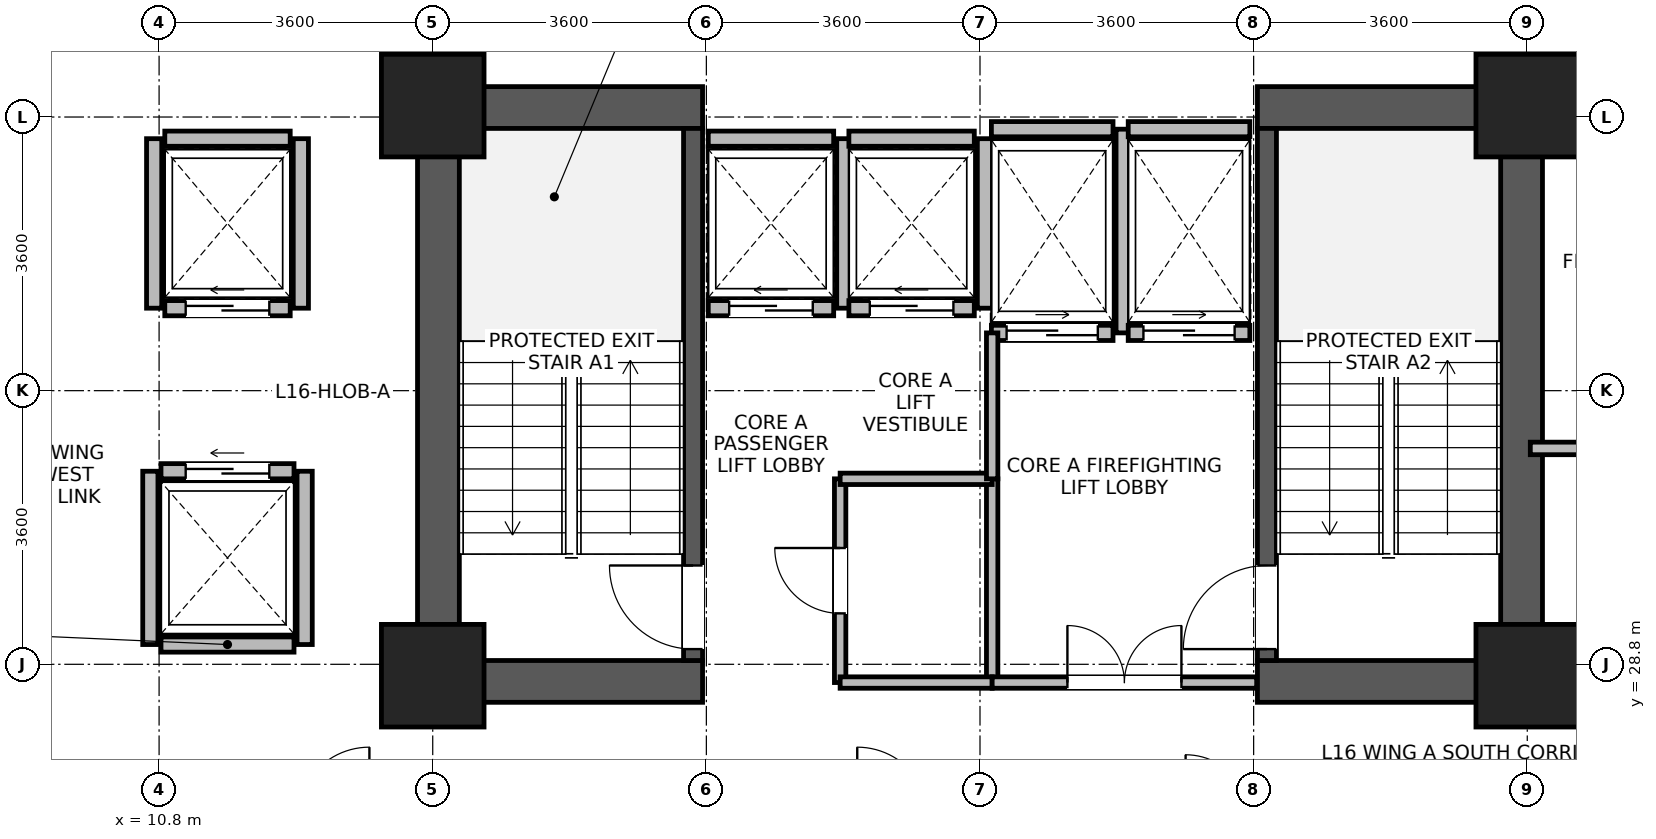
"""IFC4 building model, lengths in metres.
Left out: names, types, materials, properties, quantities, classifications, styles, units other than length and angle.
Written with IfcOpenShell. Run it as: python <this file> out.ifc"""

import sys

from ifc_helpers import new_model, si_unit, direction, frame, frame_2d, origin, origin_2d, place, context, subcontext, project, spatial, rectangle, extrude, source, transform, mapped, element, fill, save


model = new_model("IFC4")
c1 = context("Model", 3, precision=1e-05, world=origin(), true_north=direction((0.0, 1.0)))
c2 = subcontext(c1, "Body", "Model", "MODEL_VIEW")
j1 = project(units=[si_unit("LENGTHUNIT", "METRE"), si_unit("PLANEANGLEUNIT", "RADIAN")], contexts=[c1])
p1 = place(None, origin())
s1 = spatial("IfcSite", under=j1, at=p1, CompositionType="ELEMENT")
p2 = place(p1, origin())
s2 = spatial("IfcBuilding", under=s1, at=p2, CompositionType="ELEMENT")
p3 = place(p2, frame((0.0, 0.0, 66.0)))
s3 = spatial("IfcBuildingStorey", under=s2, at=p3, CompositionType="ELEMENT", Elevation=66.0)
for number, where, z_axis, x_axis in (
    (1, (14.475, 28.3, 0.0), (0.0, 0.0, 1.0), (0.0, 1.0, 0.0)),
    (2, (28.725, 28.3, 0.0), (0.0, 0.0, 1.0), (0.0, 1.0, 0.0)),
):
    element("IfcWall", number, at=place(p3, frame(where, z_axis=z_axis, x_axis=x_axis)), inside=s3, PredefinedType="SHEAR", context=c2, shape_type="SweptSolid", body=[
        extrude(rectangle(XDim=8.1, YDim=0.55, at=frame_2d((4.05, 0.0))), origin(), (0.0, 0.0, 1.0), 3.45),
    ])
for number, where, z_axis, x_axis in (
    (3, (14.75, 28.575, 0.0), (0.0, 0.0, 1.0), (1.0, 0.0, 0.0)),
    (4, (25.25, 28.575, 0.0), (0.0, 0.0, 1.0), (1.0, 0.0, 0.0)),
    (5, (14.75, 36.125, 0.0), (0.0, 0.0, 1.0), (1.0, 0.0, 0.0)),
    (6, (25.25, 36.125, 0.0), (0.0, 0.0, 1.0), (1.0, 0.0, 0.0)),
):
    element("IfcWall", number, at=place(p3, frame(where, z_axis=z_axis, x_axis=x_axis)), inside=s3, PredefinedType="SHEAR", context=c2, shape_type="SweptSolid", body=[
        extrude(rectangle(XDim=3.2, YDim=0.55, at=frame_2d((1.6, 0.0))), origin(), (0.0, 0.0, 1.0), 3.45),
    ])
p4 = place(p3, frame((17.825, 28.85, 0.0), z_axis=(0.0, 0.0, 1.0), x_axis=(0.0, 1.0, 0.0)))
e7 = element("IfcWall", 7, at=p4, inside=s3, PredefinedType="SHEAR", context=c2, shape_type="SweptSolid", body=[
    extrude(rectangle(XDim=7.0, YDim=0.25, at=frame_2d((3.5, 0.0))), origin(), (0.0, 0.0, 1.0), 3.45),
])
p5 = place(p4, frame((0.15, 0.0, 0.0)))
e8 = element("IfcOpeningElement", 8, at=p5, cuts=e7, PredefinedType="OPENING", context=c2, shape_type="SweptSolid", body=[
    extrude(rectangle(XDim=1.1, YDim=2.08, at=frame_2d((0.55, 1.04))), frame((0.0, 0.135, 0.0), z_axis=(0.0, -1.0, 0.0), x_axis=(1.0, 0.0, 0.0)), (0.0, 0.0, 1.0), 0.27),
])
p6 = place(p3, frame((25.375, 28.85, 0.0), z_axis=(0.0, 0.0, 1.0), x_axis=(0.0, 1.0, 0.0)))
e9 = element("IfcWall", 9, at=p6, inside=s3, PredefinedType="SHEAR", context=c2, shape_type="SweptSolid", body=[
    extrude(rectangle(XDim=7.0, YDim=0.25, at=frame_2d((3.5, 0.0))), origin(), (0.0, 0.0, 1.0), 3.45),
])
p7 = place(p6, frame((0.15, 0.0, 0.0)))
e10 = element("IfcOpeningElement", 10, at=p7, cuts=e9, PredefinedType="OPENING", context=c2, shape_type="SweptSolid", body=[
    extrude(rectangle(XDim=1.1, YDim=2.08, at=frame_2d((0.55, 1.04))), frame((0.0, 0.135, 0.0), z_axis=(0.0, -1.0, 0.0), x_axis=(1.0, 0.0, 0.0)), (0.0, 0.0, 1.0), 0.27),
])
m1 = source(origin(), c2, "Body", "SweptSolid", [
    extrude(rectangle(XDim=1.35, YDim=1.35, at=origin_2d()), origin(), (0.0, 0.0, 1.0), 3.7),
])
for number, where, z_axis, x_axis in (
    (11, (14.4, 28.65, 0.0), (0.0, 0.0, 1.0), (1.0, 0.0, 0.0)),
    (12, (14.4, 36.15, 0.0), (0.0, 0.0, 1.0), (1.0, 0.0, 0.0)),
    (13, (28.8, 28.65, 0.0), (0.0, 0.0, 1.0), (1.0, 0.0, 0.0)),
    (14, (28.8, 36.15, 0.0), (0.0, 0.0, 1.0), (1.0, 0.0, 0.0)),
):
    element("IfcColumn", number, at=place(p3, frame(where, z_axis=z_axis, x_axis=x_axis)), inside=s3, PredefinedType="COLUMN", context=c2, shape_type="MappedRepresentation", body=[
        mapped(m1, transform((0.0, 0.0, 0.0), x_axis=(1.0, 0.0, 0.0), y_axis=(0.0, 1.0, 0.0), z_axis=(0.0, 0.0, 1.0), scale=1.0)),
    ])
p8 = place(p3, frame((18.025, 33.485, 0.0), z_axis=(0.0, 0.0, 1.0), x_axis=(1.0, 0.0, 0.0)))
e15 = element("IfcWall", 15, at=p8, inside=s3, PredefinedType="PARTITIONING", context=c2, shape_type="SweptSolid", body=[
    extrude(rectangle(XDim=1.65, YDim=0.2, at=frame_2d((0.825, 0.0))), origin(), (0.0, 0.0, 1.0), 3.43),
])
p9 = place(p8, frame((0.275, 0.0, 0.0)))
e16 = element("IfcOpeningElement", 16, at=p9, cuts=e15, PredefinedType="OPENING", context=c2, shape_type="SweptSolid", body=[
    extrude(rectangle(XDim=1.1, YDim=2.12, at=frame_2d((0.55, 1.06))), frame((0.0, 0.11, 0.0), z_axis=(0.0, -1.0, 0.0), x_axis=(1.0, 0.0, 0.0)), (0.0, 0.0, 1.0), 0.22),
])
p10 = place(p3, frame((18.025, 35.715, 0.0), z_axis=(0.0, 0.0, 1.0), x_axis=(1.0, 0.0, 0.0)))
e17 = element("IfcWall", 17, at=p10, inside=s3, PredefinedType="PARTITIONING", context=c2, shape_type="SweptSolid", body=[
    extrude(rectangle(XDim=1.65, YDim=0.2, at=frame_2d((0.825, 0.0))), origin(), (0.0, 0.0, 1.0), 2.23),
])
p11 = place(p3, frame((19.815, 33.485, 0.0), z_axis=(0.0, 0.0, 1.0), x_axis=(0.0, 1.0, 0.0)))
e18 = element("IfcWall", 18, at=p11, inside=s3, PredefinedType="PARTITIONING", context=c2, shape_type="SweptSolid", body=[
    extrude(rectangle(XDim=2.23, YDim=0.2, at=frame_2d((1.115, 0.0))), origin(), (0.0, 0.0, 1.0), 3.43),
])
p12 = place(p3, frame((19.875, 33.485, 0.0), z_axis=(0.0, 0.0, 1.0), x_axis=(1.0, 0.0, 0.0)))
e19 = element("IfcWall", 19, at=p12, inside=s3, PredefinedType="PARTITIONING", context=c2, shape_type="SweptSolid", body=[
    extrude(rectangle(XDim=1.65, YDim=0.2, at=frame_2d((0.825, 0.0))), origin(), (0.0, 0.0, 1.0), 3.43),
])
p13 = place(p12, frame((0.275, 0.0, 0.0)))
e20 = element("IfcOpeningElement", 20, at=p13, cuts=e19, PredefinedType="OPENING", context=c2, shape_type="SweptSolid", body=[
    extrude(rectangle(XDim=1.1, YDim=2.12, at=frame_2d((0.55, 1.06))), frame((0.0, 0.11, 0.0), z_axis=(0.0, -1.0, 0.0), x_axis=(1.0, 0.0, 0.0)), (0.0, 0.0, 1.0), 0.22),
])
p14 = place(p3, frame((19.875, 35.715, 0.0), z_axis=(0.0, 0.0, 1.0), x_axis=(1.0, 0.0, 0.0)))
e21 = element("IfcWall", 21, at=p14, inside=s3, PredefinedType="PARTITIONING", context=c2, shape_type="SweptSolid", body=[
    extrude(rectangle(XDim=1.65, YDim=0.2, at=frame_2d((0.825, 0.0))), origin(), (0.0, 0.0, 1.0), 2.23),
])
p15 = place(p3, frame((21.665, 33.485, 0.0), z_axis=(0.0, 0.0, 1.0), x_axis=(0.0, 1.0, 0.0)))
e22 = element("IfcWall", 22, at=p15, inside=s3, PredefinedType="PARTITIONING", context=c2, shape_type="SweptSolid", body=[
    extrude(rectangle(XDim=2.23, YDim=0.2, at=frame_2d((1.115, 0.0))), origin(), (0.0, 0.0, 1.0), 3.43),
])
p16 = place(p3, frame((10.825, 29.06, 0.0), z_axis=(0.0, 0.0, 1.0), x_axis=(1.0, 0.0, 0.0)))
e23 = element("IfcWall", 23, at=p16, inside=s3, PredefinedType="PARTITIONING", context=c2, shape_type="SweptSolid", body=[
    extrude(rectangle(XDim=1.75, YDim=0.2, at=frame_2d((0.875, 0.0))), origin(), (0.0, 0.0, 1.0), 3.43),
])
p17 = place(p3, frame((10.825, 31.34, 0.0), z_axis=(0.0, 0.0, 1.0), x_axis=(1.0, 0.0, 0.0)))
e24 = element("IfcWall", 24, at=p17, inside=s3, PredefinedType="PARTITIONING", context=c2, shape_type="SweptSolid", body=[
    extrude(rectangle(XDim=1.75, YDim=0.2, at=frame_2d((0.875, 0.0))), origin(), (0.0, 0.0, 1.0), 3.43),
])
p18 = place(p17, frame((0.325, 0.0, 0.0)))
e25 = element("IfcOpeningElement", 25, at=p18, cuts=e24, PredefinedType="OPENING", context=c2, shape_type="SweptSolid", body=[
    extrude(rectangle(XDim=1.1, YDim=2.12, at=frame_2d((0.55, 1.06))), frame((0.0, 0.11, 0.0), z_axis=(0.0, -1.0, 0.0), x_axis=(1.0, 0.0, 0.0)), (0.0, 0.0, 1.0), 0.22),
])
for number, where, z_axis, x_axis in (
    (26, (10.685, 29.06, 0.0), (0.0, 0.0, 1.0), (0.0, 1.0, 0.0)),
    (27, (12.715, 29.06, 0.0), (0.0, 0.0, 1.0), (0.0, 1.0, 0.0)),
):
    element("IfcWall", number, at=place(p3, frame(where, z_axis=z_axis, x_axis=x_axis)), inside=s3, PredefinedType="PARTITIONING", context=c2, shape_type="SweptSolid", body=[
        extrude(rectangle(XDim=2.28, YDim=0.2, at=frame_2d((1.14, 0.0))), origin(), (0.0, 0.0, 1.0), 3.43),
    ])
p19 = place(p3, frame((10.875, 33.485, 0.0), z_axis=(0.0, 0.0, 1.0), x_axis=(1.0, 0.0, 0.0)))
e28 = element("IfcWall", 28, at=p19, inside=s3, PredefinedType="PARTITIONING", context=c2, shape_type="SweptSolid", body=[
    extrude(rectangle(XDim=1.65, YDim=0.2, at=frame_2d((0.825, 0.0))), origin(), (0.0, 0.0, 1.0), 3.43),
])
p20 = place(p19, frame((0.275, 0.0, 0.0)))
e29 = element("IfcOpeningElement", 29, at=p20, cuts=e28, PredefinedType="OPENING", context=c2, shape_type="SweptSolid", body=[
    extrude(rectangle(XDim=1.1, YDim=2.12, at=frame_2d((0.55, 1.06))), frame((0.0, 0.11, 0.0), z_axis=(0.0, -1.0, 0.0), x_axis=(1.0, 0.0, 0.0)), (0.0, 0.0, 1.0), 0.22),
])
p21 = place(p3, frame((10.875, 35.715, 0.0), z_axis=(0.0, 0.0, 1.0), x_axis=(1.0, 0.0, 0.0)))
e30 = element("IfcWall", 30, at=p21, inside=s3, PredefinedType="PARTITIONING", context=c2, shape_type="SweptSolid", body=[
    extrude(rectangle(XDim=1.65, YDim=0.2, at=frame_2d((0.825, 0.0))), origin(), (0.0, 0.0, 1.0), 3.43),
])
for number, where, z_axis, x_axis in (
    (31, (10.735, 33.485, 0.0), (0.0, 0.0, 1.0), (0.0, 1.0, 0.0)),
    (32, (12.665, 33.485, 0.0), (0.0, 0.0, 1.0), (0.0, 1.0, 0.0)),
):
    element("IfcWall", number, at=place(p3, frame(where, z_axis=z_axis, x_axis=x_axis)), inside=s3, PredefinedType="PARTITIONING", context=c2, shape_type="SweptSolid", body=[
        extrude(rectangle(XDim=2.23, YDim=0.2, at=frame_2d((1.115, 0.0))), origin(), (0.0, 0.0, 1.0), 3.43),
    ])
p22 = place(p3, frame((21.75, 33.16, 0.0), z_axis=(0.0, 0.0, 1.0), x_axis=(1.0, 0.0, 0.0)))
e33 = element("IfcWall", 33, at=p22, inside=s3, PredefinedType="PARTITIONING", context=c2, shape_type="SweptSolid", body=[
    extrude(rectangle(XDim=1.6, YDim=0.2, at=frame_2d((0.8, 0.0))), origin(), (0.0, 0.0, 1.0), 3.43),
])
p23 = place(p22, frame((0.2, 0.0, 0.0)))
e34 = element("IfcOpeningElement", 34, at=p23, cuts=e33, PredefinedType="OPENING", context=c2, shape_type="SweptSolid", body=[
    extrude(rectangle(XDim=1.2, YDim=2.12, at=frame_2d((0.6, 1.06))), frame((0.0, 0.11, 0.0), z_axis=(0.0, -1.0, 0.0), x_axis=(1.0, 0.0, 0.0)), (0.0, 0.0, 1.0), 0.22),
])
p24 = place(p3, frame((21.75, 35.84, 0.0), z_axis=(0.0, 0.0, 1.0), x_axis=(1.0, 0.0, 0.0)))
e35 = element("IfcWall", 35, at=p24, inside=s3, PredefinedType="PARTITIONING", context=c2, shape_type="SweptSolid", body=[
    extrude(rectangle(XDim=1.6, YDim=0.2, at=frame_2d((0.8, 0.0))), origin(), (0.0, 0.0, 1.0), 2.23),
])
p25 = place(p3, frame((23.49, 33.16, 0.0), z_axis=(0.0, 0.0, 1.0), x_axis=(0.0, 1.0, 0.0)))
e36 = element("IfcWall", 36, at=p25, inside=s3, PredefinedType="PARTITIONING", context=c2, shape_type="SweptSolid", body=[
    extrude(rectangle(XDim=2.68, YDim=0.2, at=frame_2d((1.34, 0.0))), origin(), (0.0, 0.0, 1.0), 3.43),
])
p26 = place(p3, frame((23.55, 33.16, 0.0), z_axis=(0.0, 0.0, 1.0), x_axis=(1.0, 0.0, 0.0)))
e37 = element("IfcWall", 37, at=p26, inside=s3, PredefinedType="PARTITIONING", context=c2, shape_type="SweptSolid", body=[
    extrude(rectangle(XDim=1.6, YDim=0.2, at=frame_2d((0.8, 0.0))), origin(), (0.0, 0.0, 1.0), 3.43),
])
p27 = place(p26, frame((0.2, 0.0, 0.0)))
e38 = element("IfcOpeningElement", 38, at=p27, cuts=e37, PredefinedType="OPENING", context=c2, shape_type="SweptSolid", body=[
    extrude(rectangle(XDim=1.2, YDim=2.12, at=frame_2d((0.6, 1.06))), frame((0.0, 0.11, 0.0), z_axis=(0.0, -1.0, 0.0), x_axis=(1.0, 0.0, 0.0)), (0.0, 0.0, 1.0), 0.22),
])
p28 = place(p3, frame((23.55, 35.84, 0.0), z_axis=(0.0, 0.0, 1.0), x_axis=(1.0, 0.0, 0.0)))
e39 = element("IfcWall", 39, at=p28, inside=s3, PredefinedType="PARTITIONING", context=c2, shape_type="SweptSolid", body=[
    extrude(rectangle(XDim=1.6, YDim=0.2, at=frame_2d((0.8, 0.0))), origin(), (0.0, 0.0, 1.0), 2.23),
])
p29 = place(p3, frame((19.76, 28.56, 0.0), z_axis=(0.0, 0.0, 1.0), x_axis=(0.0, 1.0, 0.0)))
e40 = element("IfcWall", 40, at=p29, inside=s3, PredefinedType="PARTITIONING", context=c2, shape_type="SweptSolid", body=[
    extrude(rectangle(XDim=2.68, YDim=0.15, at=frame_2d((1.34, 0.0))), origin(), (0.0, 0.0, 1.0), 3.43),
])
p30 = place(p29, frame((0.91, 0.0, 0.0)))
e41 = element("IfcOpeningElement", 41, at=p30, cuts=e40, PredefinedType="OPENING", context=c2, shape_type="SweptSolid", body=[
    extrude(rectangle(XDim=0.86, YDim=2.02, at=frame_2d((0.43, 1.01))), frame((0.0, 0.085, 0.0), z_axis=(0.0, -1.0, 0.0), x_axis=(1.0, 0.0, 0.0)), (0.0, 0.0, 1.0), 0.17),
])
p31 = place(p3, frame((21.76, 28.56, 0.0), z_axis=(0.0, 0.0, 1.0), x_axis=(0.0, 1.0, 0.0)))
e42 = element("IfcWall", 42, at=p31, inside=s3, PredefinedType="PARTITIONING", context=c2, shape_type="SweptSolid", body=[
    extrude(rectangle(XDim=2.68, YDim=0.15, at=frame_2d((1.34, 0.0))), origin(), (0.0, 0.0, 1.0), 3.43),
])
p32 = place(p3, frame((19.76, 28.56, 0.0), z_axis=(0.0, 0.0, 1.0), x_axis=(1.0, 0.0, 0.0)))
e43 = element("IfcWall", 43, at=p32, inside=s3, PredefinedType="PARTITIONING", context=c2, shape_type="SweptSolid", body=[
    extrude(rectangle(XDim=2.0, YDim=0.15, at=frame_2d((1.0, 0.0))), origin(), (0.0, 0.0, 1.0), 2.23),
])
p33 = place(p3, frame((19.76, 31.24, 0.0), z_axis=(0.0, 0.0, 1.0), x_axis=(1.0, 0.0, 0.0)))
e44 = element("IfcWall", 44, at=p33, inside=s3, PredefinedType="PARTITIONING", context=c2, shape_type="SweptSolid", body=[
    extrude(rectangle(XDim=2.0, YDim=0.15, at=frame_2d((1.0, 0.0))), origin(), (0.0, 0.0, 1.0), 3.43),
])
p34 = place(p3, frame((28.84, 31.64, 0.0), z_axis=(0.0, 0.0, 1.0), x_axis=(1.0, 0.0, 0.0)))
e45 = element("IfcWall", 45, at=p34, inside=s3, PredefinedType="PARTITIONING", context=c2, shape_type="SweptSolid", body=[
    extrude(rectangle(XDim=4.52, YDim=0.165, at=frame_2d((2.26, 0.0))), origin(), (0.0, 0.0, 1.0), 3.43),
])
p35 = place(p3, frame((21.76, 28.56, 0.0), z_axis=(0.0, 0.0, 1.0), x_axis=(1.0, 0.0, 0.0)))
e46 = element("IfcWall", 46, at=p35, inside=s3, PredefinedType="PARTITIONING", context=c2, shape_type="SweptSolid", body=[
    extrude(rectangle(XDim=3.48, YDim=0.15, at=frame_2d((1.74, 0.0))), origin(), (0.0, 0.0, 1.0), 2.23),
])
p36 = place(p35, frame((0.99, 0.0, 0.0)))
e47 = element("IfcOpeningElement", 47, at=p36, cuts=e46, PredefinedType="OPENING", context=c2, shape_type="SweptSolid", body=[
    extrude(rectangle(XDim=1.5, YDim=2.1, at=frame_2d((0.75, 1.05))), frame((0.0, 0.085, 0.0), z_axis=(0.0, -1.0, 0.0), x_axis=(1.0, 0.0, 0.0)), (0.0, 0.0, 1.0), 0.17),
])
p37 = place(p3, frame((21.76, 31.24, 0.0), z_axis=(0.0, 0.0, 1.0), x_axis=(0.0, 1.0, 0.0)))
e48 = element("IfcWall", 48, at=p37, inside=s3, PredefinedType="PARTITIONING", context=c2, shape_type="SweptSolid", body=[
    extrude(rectangle(XDim=1.92, YDim=0.15, at=frame_2d((0.96, 0.0))), origin(), (0.0, 0.0, 1.0), 3.43),
])
p38 = place(p5, origin())
e49 = element("IfcDoor", 49, at=p38, inside=s3, OperationType="SINGLE_SWING_RIGHT", PredefinedType="DOOR", context=c2, shape_type="SweptSolid", body=[
    extrude(rectangle(XDim=1.1, YDim=2.08, at=frame_2d((0.55, 1.04))), frame((0.0, 0.025, 0.0), z_axis=(0.0, -1.0, 0.0), x_axis=(1.0, 0.0, 0.0)), (0.0, 0.0, 1.0), 0.05),
])
fill(e8, e49)
p39 = place(p7, origin())
e50 = element("IfcDoor", 50, at=p39, inside=s3, OperationType="SINGLE_SWING_LEFT", PredefinedType="DOOR", context=c2, shape_type="SweptSolid", body=[
    extrude(rectangle(XDim=1.1, YDim=2.08, at=frame_2d((0.55, 1.04))), frame((0.0, 0.025, 0.0), z_axis=(0.0, -1.0, 0.0), x_axis=(1.0, 0.0, 0.0)), (0.0, 0.0, 1.0), 0.05),
])
fill(e10, e50)
p40 = place(p9, origin())
e51 = element("IfcDoor", 51, at=p40, inside=s3, OperationType="SLIDING_TO_LEFT", PredefinedType="DOOR", context=c2, shape_type="SweptSolid", body=[
    extrude(rectangle(XDim=1.1, YDim=2.12, at=frame_2d((0.55, 1.06))), frame((0.0, 0.025, 0.0), z_axis=(0.0, -1.0, 0.0), x_axis=(1.0, 0.0, 0.0)), (0.0, 0.0, 1.0), 0.05),
])
fill(e16, e51)
p41 = place(p13, origin())
e52 = element("IfcDoor", 52, at=p41, inside=s3, OperationType="SLIDING_TO_LEFT", PredefinedType="DOOR", context=c2, shape_type="SweptSolid", body=[
    extrude(rectangle(XDim=1.1, YDim=2.12, at=frame_2d((0.55, 1.06))), frame((0.0, 0.025, 0.0), z_axis=(0.0, -1.0, 0.0), x_axis=(1.0, 0.0, 0.0)), (0.0, 0.0, 1.0), 0.05),
])
fill(e20, e52)
p42 = place(p18, origin())
e53 = element("IfcDoor", 53, at=p42, inside=s3, OperationType="SLIDING_TO_LEFT", PredefinedType="DOOR", context=c2, shape_type="SweptSolid", body=[
    extrude(rectangle(XDim=1.1, YDim=2.12, at=frame_2d((0.55, 1.06))), frame((0.0, 0.025, 0.0), z_axis=(0.0, -1.0, 0.0), x_axis=(1.0, 0.0, 0.0)), (0.0, 0.0, 1.0), 0.05),
])
fill(e25, e53)
p43 = place(p20, origin())
e54 = element("IfcDoor", 54, at=p43, inside=s3, OperationType="SLIDING_TO_LEFT", PredefinedType="DOOR", context=c2, shape_type="SweptSolid", body=[
    extrude(rectangle(XDim=1.1, YDim=2.12, at=frame_2d((0.55, 1.06))), frame((0.0, 0.025, 0.0), z_axis=(0.0, -1.0, 0.0), x_axis=(1.0, 0.0, 0.0)), (0.0, 0.0, 1.0), 0.05),
])
fill(e29, e54)
p44 = place(p23, origin())
e55 = element("IfcDoor", 55, at=p44, inside=s3, OperationType="SLIDING_TO_RIGHT", PredefinedType="DOOR", context=c2, shape_type="SweptSolid", body=[
    extrude(rectangle(XDim=1.2, YDim=2.12, at=frame_2d((0.6, 1.06))), frame((0.0, 0.025, 0.0), z_axis=(0.0, -1.0, 0.0), x_axis=(1.0, 0.0, 0.0)), (0.0, 0.0, 1.0), 0.05),
])
fill(e34, e55)
p45 = place(p27, origin())
e56 = element("IfcDoor", 56, at=p45, inside=s3, OperationType="SLIDING_TO_RIGHT", PredefinedType="DOOR", context=c2, shape_type="SweptSolid", body=[
    extrude(rectangle(XDim=1.2, YDim=2.12, at=frame_2d((0.6, 1.06))), frame((0.0, 0.025, 0.0), z_axis=(0.0, -1.0, 0.0), x_axis=(1.0, 0.0, 0.0)), (0.0, 0.0, 1.0), 0.05),
])
fill(e38, e56)
p46 = place(p30, origin())
e57 = element("IfcDoor", 57, at=p46, inside=s3, OperationType="SINGLE_SWING_RIGHT", PredefinedType="DOOR", context=c2, shape_type="SweptSolid", body=[
    extrude(rectangle(XDim=0.86, YDim=2.02, at=frame_2d((0.43, 1.01))), frame((0.0, 0.025, 0.0), z_axis=(0.0, -1.0, 0.0), x_axis=(1.0, 0.0, 0.0)), (0.0, 0.0, 1.0), 0.05),
])
fill(e41, e57)
p47 = place(p36, origin())
e58 = element("IfcDoor", 58, at=p47, inside=s3, OperationType="DOUBLE_DOOR_SINGLE_SWING", PredefinedType="DOOR", context=c2, shape_type="SweptSolid", body=[
    extrude(rectangle(XDim=1.5, YDim=2.1, at=frame_2d((0.75, 1.05))), frame((0.0, 0.025, 0.0), z_axis=(0.0, -1.0, 0.0), x_axis=(1.0, 0.0, 0.0)), (0.0, 0.0, 1.0), 0.05),
])
fill(e47, e58)
save(model, sys.argv[1])
